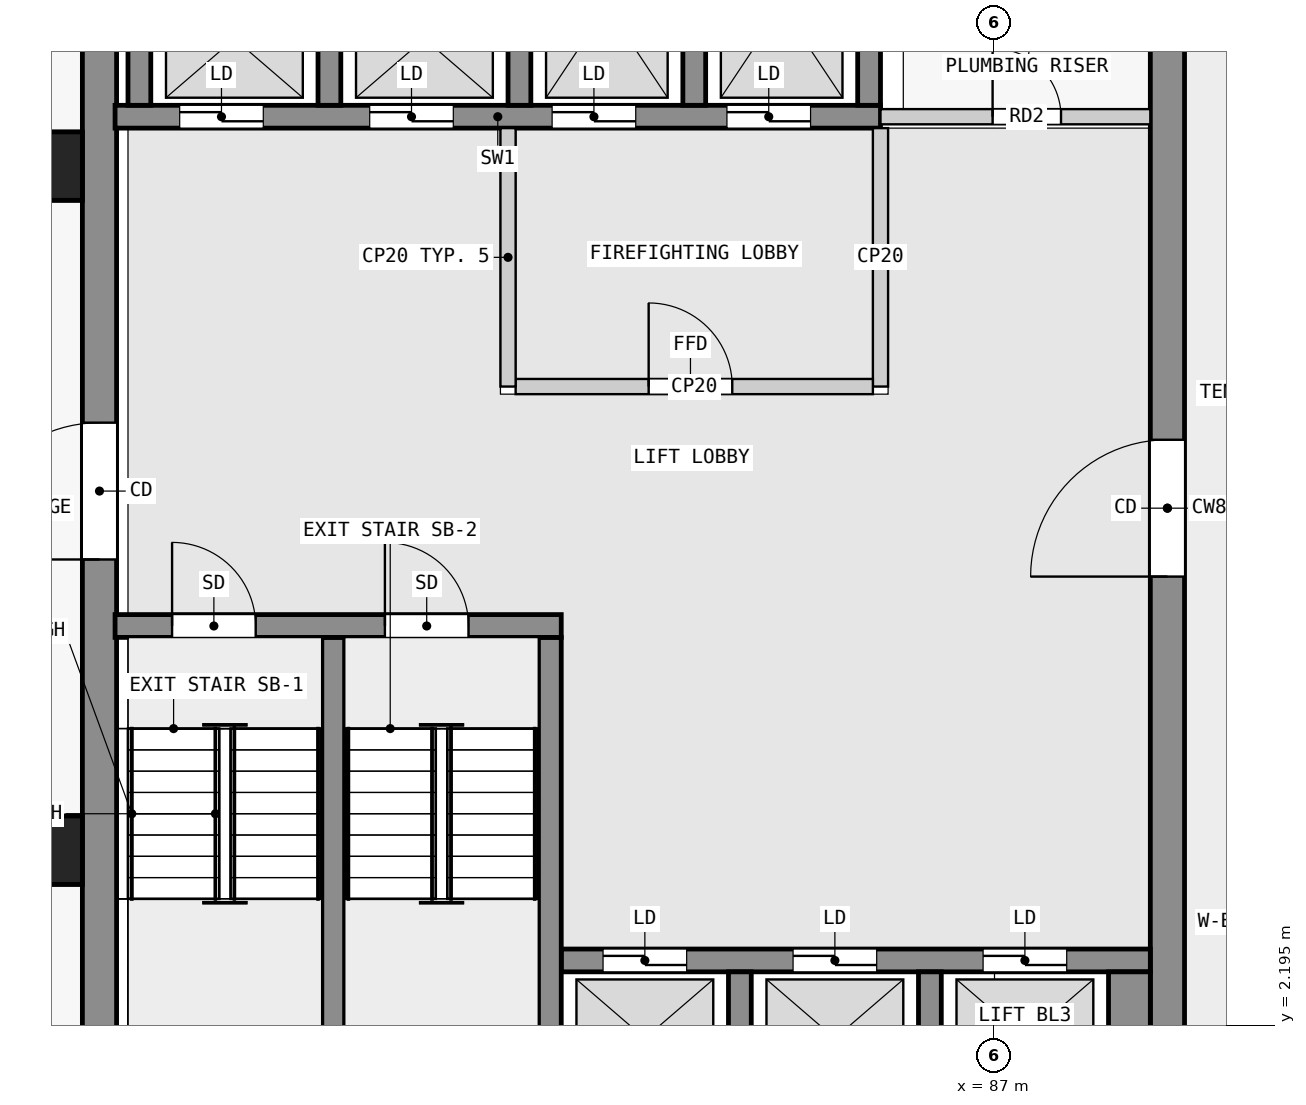
"""IFC4 building model, lengths in metres.
Left out: names, types, materials, properties, quantities, classifications, styles, units other than length and angle.
Written with IfcOpenShell. Run it as: python <this file> out.ifc"""

import sys

from ifc_helpers import new_model, si_unit, direction, frame, frame_2d, origin, origin_2d, place, context, subcontext, project, spatial, rectangle, extrude, element, fill, save


model = new_model("IFC4")
c1 = context("Model", 3, precision=1e-05, world=origin(), true_north=direction((0.0, 1.0)))
c2 = subcontext(c1, "Body", "Model", "MODEL_VIEW")
j1 = project(units=[si_unit("LENGTHUNIT", "METRE"), si_unit("PLANEANGLEUNIT", "RADIAN")], contexts=[c1])
p1 = place(None, origin())
s1 = spatial("IfcSite", under=j1, at=p1, CompositionType="ELEMENT")
p2 = place(p1, origin())
s2 = spatial("IfcBuilding", under=s1, at=p2, CompositionType="ELEMENT")
p3 = place(p2, frame((0.0, 0.0, 72.3)))
s3 = spatial("IfcBuildingStorey", under=s2, at=p3, CompositionType="ELEMENT", Elevation=72.3)
for number, where, z_axis, x_axis in (
    (1, (74.55, 13.5, 0.0), (0.0, 0.0, 1.0), (1.0, 0.0, 0.0)),
    (2, (74.55, 4.5, 0.0), (0.0, 0.0, 1.0), (1.0, 0.0, 0.0)),
):
    element("IfcColumn", number, at=place(p3, frame(where, z_axis=z_axis, x_axis=x_axis)), inside=s3, PredefinedType="COLUMN", context=c2, shape_type="SweptSolid", body=[
        extrude(rectangle(XDim=0.9, YDim=0.9, at=origin_2d()), origin(), (0.0, 0.0, 1.0), 6.0),
    ])
p4 = place(p3, frame((75.225, 0.45, 0.0), z_axis=(0.0, 0.0, 1.0), x_axis=(0.0, 1.0, 0.0)))
e3 = element("IfcWall", 3, at=p4, inside=s3, PredefinedType="SHEAR", context=c2, shape_type="SweptSolid", body=[
    extrude(rectangle(XDim=17.1, YDim=0.45, at=frame_2d((8.55, 0.0))), origin(), (0.0, 0.0, 1.0), 5.75),
])
p5 = place(p4, frame((7.875, 0.0, 0.0)))
e4 = element("IfcOpeningElement", 4, at=p5, cuts=e3, PredefinedType="OPENING", context=c2, shape_type="SweptSolid", body=[
    extrude(rectangle(XDim=1.8, YDim=2.1, at=frame_2d((0.9, 1.05))), frame((0.0, 0.235, 0.0), z_axis=(0.0, -1.0, 0.0), x_axis=(1.0, 0.0, 0.0)), (0.0, 0.0, 1.0), 0.47),
])
p6 = place(p3, frame((89.275, 0.45, 0.0), z_axis=(0.0, 0.0, 1.0), x_axis=(0.0, 1.0, 0.0)))
e5 = element("IfcWall", 5, at=p6, inside=s3, PredefinedType="SHEAR", context=c2, shape_type="SweptSolid", body=[
    extrude(rectangle(XDim=17.1, YDim=0.45, at=frame_2d((8.55, 0.0))), origin(), (0.0, 0.0, 1.0), 5.75),
])
p7 = place(p6, frame((7.65, 0.0, 0.0)))
e6 = element("IfcOpeningElement", 6, at=p7, cuts=e5, PredefinedType="OPENING", context=c2, shape_type="SweptSolid", body=[
    extrude(rectangle(XDim=1.8, YDim=2.1, at=frame_2d((0.9, 1.05))), frame((0.0, 0.235, 0.0), z_axis=(0.0, -1.0, 0.0), x_axis=(1.0, 0.0, 0.0)), (0.0, 0.0, 1.0), 0.47),
])
p8 = place(p6, frame((15.65, 0.0, 0.0)))
e7 = element("IfcOpeningElement", 7, at=p8, cuts=e5, PredefinedType="OPENING", context=c2, shape_type="SweptSolid", body=[
    extrude(rectangle(XDim=0.9, YDim=2.1, at=frame_2d((0.45, 1.05))), frame((0.0, 0.235, 0.0), z_axis=(0.0, -1.0, 0.0), x_axis=(1.0, 0.0, 0.0)), (0.0, 0.0, 1.0), 0.47),
])
p9 = place(p3, frame((75.43, 7.45, 0.0), z_axis=(0.0, 0.0, 1.0), x_axis=(1.0, 0.0, 0.0)))
e8 = element("IfcWall", 8, at=p9, inside=s3, PredefinedType="SHEAR", context=c2, shape_type="SweptSolid", body=[
    extrude(rectangle(XDim=5.87, YDim=0.3, at=frame_2d((2.935, 0.0))), origin(), (0.0, 0.0, 1.0), 5.75),
])
p10 = place(p9, frame((0.75, 0.0, 0.0)))
e9 = element("IfcOpeningElement", 9, at=p10, cuts=e8, PredefinedType="OPENING", context=c2, shape_type="SweptSolid", body=[
    extrude(rectangle(XDim=1.1, YDim=2.1, at=frame_2d((0.55, 1.05))), frame((0.0, 0.16, 0.0), z_axis=(0.0, -1.0, 0.0), x_axis=(1.0, 0.0, 0.0)), (0.0, 0.0, 1.0), 0.32),
])
p11 = place(p9, frame((3.55, 0.0, 0.0)))
e10 = element("IfcOpeningElement", 10, at=p11, cuts=e8, PredefinedType="OPENING", context=c2, shape_type="SweptSolid", body=[
    extrude(rectangle(XDim=1.1, YDim=2.1, at=frame_2d((0.55, 1.05))), frame((0.0, 0.16, 0.0), z_axis=(0.0, -1.0, 0.0), x_axis=(1.0, 0.0, 0.0)), (0.0, 0.0, 1.0), 0.32),
])
for number, where, z_axis, x_axis in (
    (11, (78.3, 0.9, 0.0), (0.0, 0.0, 1.0), (0.0, 1.0, 0.0)),
    (12, (81.15, 0.9, 0.0), (0.0, 0.0, 1.0), (0.0, 1.0, 0.0)),
):
    element("IfcWall", number, at=place(p3, frame(where, z_axis=z_axis, x_axis=x_axis)), inside=s3, PredefinedType="SHEAR", context=c2, shape_type="SweptSolid", body=[
        extrude(rectangle(XDim=6.4, YDim=0.3, at=frame_2d((3.2, 0.0))), origin(), (0.0, 0.0, 1.0), 5.75),
    ])
for number, where, z_axis, x_axis in (
    (13, (83.65, 0.9, 0.0), (0.0, 0.0, 1.0), (0.0, 1.0, 0.0)),
    (14, (86.15, 0.9, 0.0), (0.0, 0.0, 1.0), (0.0, 1.0, 0.0)),
):
    element("IfcWall", number, at=place(p3, frame(where, z_axis=z_axis, x_axis=x_axis)), inside=s3, PredefinedType="SHEAR", context=c2, shape_type="SweptSolid", body=[
        extrude(rectangle(XDim=2.0, YDim=0.3, at=frame_2d((1.0, 0.0))), origin(), (0.0, 0.0, 1.0), 5.75),
    ])
p12 = place(p3, frame((88.775, 0.9, 0.0), z_axis=(0.0, 0.0, 1.0), x_axis=(0.0, 1.0, 0.0)))
e15 = element("IfcWall", 15, at=p12, inside=s3, PredefinedType="SHEAR", context=c2, shape_type="SweptSolid", body=[
    extrude(rectangle(XDim=2.0, YDim=0.55, at=frame_2d((1.0, 0.0))), origin(), (0.0, 0.0, 1.0), 5.75),
])
p13 = place(p3, frame((81.3, 3.05, 0.0), z_axis=(0.0, 0.0, 1.0), x_axis=(1.0, 0.0, 0.0)))
e16 = element("IfcWall", 16, at=p13, inside=s3, PredefinedType="SHEAR", context=c2, shape_type="SweptSolid", body=[
    extrude(rectangle(XDim=7.75, YDim=0.3, at=frame_2d((3.875, 0.0))), origin(), (0.0, 0.0, 1.0), 5.75),
])
p14 = place(p13, frame((0.55, 0.0, 0.0)))
e17 = element("IfcOpeningElement", 17, at=p14, cuts=e16, PredefinedType="OPENING", context=c2, shape_type="SweptSolid", body=[
    extrude(rectangle(XDim=1.1, YDim=2.1, at=frame_2d((0.55, 1.05))), frame((0.0, 0.16, 0.0), z_axis=(0.0, -1.0, 0.0), x_axis=(1.0, 0.0, 0.0)), (0.0, 0.0, 1.0), 0.32),
])
p15 = place(p13, frame((3.05, 0.0, 0.0)))
e18 = element("IfcOpeningElement", 18, at=p15, cuts=e16, PredefinedType="OPENING", context=c2, shape_type="SweptSolid", body=[
    extrude(rectangle(XDim=1.1, YDim=2.1, at=frame_2d((0.55, 1.05))), frame((0.0, 0.16, 0.0), z_axis=(0.0, -1.0, 0.0), x_axis=(1.0, 0.0, 0.0)), (0.0, 0.0, 1.0), 0.32),
])
p16 = place(p13, frame((5.55, 0.0, 0.0)))
e19 = element("IfcOpeningElement", 19, at=p16, cuts=e16, PredefinedType="OPENING", context=c2, shape_type="SweptSolid", body=[
    extrude(rectangle(XDim=1.1, YDim=2.1, at=frame_2d((0.55, 1.05))), frame((0.0, 0.16, 0.0), z_axis=(0.0, -1.0, 0.0), x_axis=(1.0, 0.0, 0.0)), (0.0, 0.0, 1.0), 0.32),
])
p17 = place(p3, frame((75.43, 14.15, 0.0), z_axis=(0.0, 0.0, 1.0), x_axis=(1.0, 0.0, 0.0)))
e20 = element("IfcWall", 20, at=p17, inside=s3, PredefinedType="SHEAR", context=c2, shape_type="SweptSolid", body=[
    extrude(rectangle(XDim=10.07, YDim=0.3, at=frame_2d((5.035, 0.0))), origin(), (0.0, 0.0, 1.0), 5.75),
])
p18 = place(p17, frame((0.85, 0.0, 0.0)))
e21 = element("IfcOpeningElement", 21, at=p18, cuts=e20, PredefinedType="OPENING", context=c2, shape_type="SweptSolid", body=[
    extrude(rectangle(XDim=1.1, YDim=2.1, at=frame_2d((0.55, 1.05))), frame((0.0, 0.16, 0.0), z_axis=(0.0, -1.0, 0.0), x_axis=(1.0, 0.0, 0.0)), (0.0, 0.0, 1.0), 0.32),
])
p19 = place(p17, frame((3.35, 0.0, 0.0)))
e22 = element("IfcOpeningElement", 22, at=p19, cuts=e20, PredefinedType="OPENING", context=c2, shape_type="SweptSolid", body=[
    extrude(rectangle(XDim=1.1, YDim=2.1, at=frame_2d((0.55, 1.05))), frame((0.0, 0.16, 0.0), z_axis=(0.0, -1.0, 0.0), x_axis=(1.0, 0.0, 0.0)), (0.0, 0.0, 1.0), 0.32),
])
p20 = place(p17, frame((5.75, 0.0, 0.0)))
e23 = element("IfcOpeningElement", 23, at=p20, cuts=e20, PredefinedType="OPENING", context=c2, shape_type="SweptSolid", body=[
    extrude(rectangle(XDim=1.1, YDim=2.1, at=frame_2d((0.55, 1.05))), frame((0.0, 0.16, 0.0), z_axis=(0.0, -1.0, 0.0), x_axis=(1.0, 0.0, 0.0)), (0.0, 0.0, 1.0), 0.32),
])
p21 = place(p17, frame((8.05, 0.0, 0.0)))
e24 = element("IfcOpeningElement", 24, at=p21, cuts=e20, PredefinedType="OPENING", context=c2, shape_type="SweptSolid", body=[
    extrude(rectangle(XDim=1.1, YDim=2.1, at=frame_2d((0.55, 1.05))), frame((0.0, 0.16, 0.0), z_axis=(0.0, -1.0, 0.0), x_axis=(1.0, 0.0, 0.0)), (0.0, 0.0, 1.0), 0.32),
])
for number, where, z_axis, x_axis in (
    (25, (75.75, 14.3, 0.0), (0.0, 0.0, 1.0), (0.0, 1.0, 0.0)),
    (26, (78.25, 14.3, 0.0), (0.0, 0.0, 1.0), (0.0, 1.0, 0.0)),
    (27, (80.75, 14.3, 0.0), (0.0, 0.0, 1.0), (0.0, 1.0, 0.0)),
    (28, (83.05, 14.3, 0.0), (0.0, 0.0, 1.0), (0.0, 1.0, 0.0)),
    (29, (85.35, 14.3, 0.0), (0.0, 0.0, 1.0), (0.0, 1.0, 0.0)),
):
    element("IfcWall", number, at=place(p3, frame(where, z_axis=z_axis, x_axis=x_axis)), inside=s3, PredefinedType="SHEAR", context=c2, shape_type="SweptSolid", body=[
        extrude(rectangle(XDim=2.8, YDim=0.3, at=frame_2d((1.4, 0.0))), origin(), (0.0, 0.0, 1.0), 5.75),
    ])
p22 = place(p3, frame((80.6, 10.6, 0.0), z_axis=(0.0, 0.0, 1.0), x_axis=(0.0, 1.0, 0.0)))
e30 = element("IfcWall", 30, at=p22, inside=s3, PredefinedType="PARTITIONING", context=c2, shape_type="SweptSolid", body=[
    extrude(rectangle(XDim=3.4, YDim=0.2, at=frame_2d((1.7, 0.0))), origin(), (0.0, 0.0, 1.0), 5.75),
])
p23 = place(p3, frame((80.7, 10.6, 0.0), z_axis=(0.0, 0.0, 1.0), x_axis=(1.0, 0.0, 0.0)))
e31 = element("IfcWall", 31, at=p23, inside=s3, PredefinedType="PARTITIONING", context=c2, shape_type="SweptSolid", body=[
    extrude(rectangle(XDim=4.7, YDim=0.2, at=frame_2d((2.35, 0.0))), origin(), (0.0, 0.0, 1.0), 5.75),
])
p24 = place(p23, frame((1.75, 0.0, 0.0)))
e32 = element("IfcOpeningElement", 32, at=p24, cuts=e31, PredefinedType="OPENING", context=c2, shape_type="SweptSolid", body=[
    extrude(rectangle(XDim=1.1, YDim=2.1, at=frame_2d((0.55, 1.05))), frame((0.0, 0.11, 0.0), z_axis=(0.0, -1.0, 0.0), x_axis=(1.0, 0.0, 0.0)), (0.0, 0.0, 1.0), 0.22),
])
p25 = place(p3, frame((85.5, 10.6, 0.0), z_axis=(0.0, 0.0, 1.0), x_axis=(0.0, 1.0, 0.0)))
e33 = element("IfcWall", 33, at=p25, inside=s3, PredefinedType="PARTITIONING", context=c2, shape_type="SweptSolid", body=[
    extrude(rectangle(XDim=3.4, YDim=0.2, at=frame_2d((1.7, 0.0))), origin(), (0.0, 0.0, 1.0), 5.75),
])
p26 = place(p3, frame((85.5, 14.15, 0.0), z_axis=(0.0, 0.0, 1.0), x_axis=(1.0, 0.0, 0.0)))
e34 = element("IfcWall", 34, at=p26, inside=s3, PredefinedType="PARTITIONING", context=c2, shape_type="SweptSolid", body=[
    extrude(rectangle(XDim=3.55, YDim=0.2, at=frame_2d((1.775, 0.0))), origin(), (0.0, 0.0, 1.0), 5.75),
])
p27 = place(p26, frame((1.475, 0.0, 0.0)))
e35 = element("IfcOpeningElement", 35, at=p27, cuts=e34, PredefinedType="OPENING", context=c2, shape_type="SweptSolid", body=[
    extrude(rectangle(XDim=0.9, YDim=2.1, at=frame_2d((0.45, 1.05))), frame((0.0, 0.11, 0.0), z_axis=(0.0, -1.0, 0.0), x_axis=(1.0, 0.0, 0.0)), (0.0, 0.0, 1.0), 0.22),
])
p28 = place(p24, origin())
e36 = element("IfcDoor", 36, at=p28, inside=s3, OperationType="SINGLE_SWING_LEFT", PredefinedType="DOOR", context=c2, shape_type="SweptSolid", body=[
    extrude(rectangle(XDim=1.1, YDim=2.1, at=frame_2d((0.55, 1.05))), frame((0.0, 0.025, 0.0), z_axis=(0.0, -1.0, 0.0), x_axis=(1.0, 0.0, 0.0)), (0.0, 0.0, 1.0), 0.05),
])
fill(e32, e36)
p29 = place(p14, origin())
e37 = element("IfcDoor", 37, at=p29, inside=s3, OperationType="DOUBLE_DOOR_SLIDING", PredefinedType="DOOR", context=c2, shape_type="SweptSolid", body=[
    extrude(rectangle(XDim=1.1, YDim=2.1, at=frame_2d((0.55, 1.05))), frame((0.0, 0.025, 0.0), z_axis=(0.0, -1.0, 0.0), x_axis=(1.0, 0.0, 0.0)), (0.0, 0.0, 1.0), 0.05),
])
fill(e17, e37)
p30 = place(p15, origin())
e38 = element("IfcDoor", 38, at=p30, inside=s3, OperationType="DOUBLE_DOOR_SLIDING", PredefinedType="DOOR", context=c2, shape_type="SweptSolid", body=[
    extrude(rectangle(XDim=1.1, YDim=2.1, at=frame_2d((0.55, 1.05))), frame((0.0, 0.025, 0.0), z_axis=(0.0, -1.0, 0.0), x_axis=(1.0, 0.0, 0.0)), (0.0, 0.0, 1.0), 0.05),
])
fill(e18, e38)
p31 = place(p16, origin())
e39 = element("IfcDoor", 39, at=p31, inside=s3, OperationType="DOUBLE_DOOR_SLIDING", PredefinedType="DOOR", context=c2, shape_type="SweptSolid", body=[
    extrude(rectangle(XDim=1.1, YDim=2.1, at=frame_2d((0.55, 1.05))), frame((0.0, 0.025, 0.0), z_axis=(0.0, -1.0, 0.0), x_axis=(1.0, 0.0, 0.0)), (0.0, 0.0, 1.0), 0.05),
])
fill(e19, e39)
p32 = place(p18, origin())
e40 = element("IfcDoor", 40, at=p32, inside=s3, OperationType="DOUBLE_DOOR_SLIDING", PredefinedType="DOOR", context=c2, shape_type="SweptSolid", body=[
    extrude(rectangle(XDim=1.1, YDim=2.1, at=frame_2d((0.55, 1.05))), frame((0.0, 0.025, 0.0), z_axis=(0.0, -1.0, 0.0), x_axis=(1.0, 0.0, 0.0)), (0.0, 0.0, 1.0), 0.05),
])
fill(e21, e40)
p33 = place(p19, origin())
e41 = element("IfcDoor", 41, at=p33, inside=s3, OperationType="DOUBLE_DOOR_SLIDING", PredefinedType="DOOR", context=c2, shape_type="SweptSolid", body=[
    extrude(rectangle(XDim=1.1, YDim=2.1, at=frame_2d((0.55, 1.05))), frame((0.0, 0.025, 0.0), z_axis=(0.0, -1.0, 0.0), x_axis=(1.0, 0.0, 0.0)), (0.0, 0.0, 1.0), 0.05),
])
fill(e22, e41)
p34 = place(p20, origin())
e42 = element("IfcDoor", 42, at=p34, inside=s3, OperationType="DOUBLE_DOOR_SLIDING", PredefinedType="DOOR", context=c2, shape_type="SweptSolid", body=[
    extrude(rectangle(XDim=1.1, YDim=2.1, at=frame_2d((0.55, 1.05))), frame((0.0, 0.025, 0.0), z_axis=(0.0, -1.0, 0.0), x_axis=(1.0, 0.0, 0.0)), (0.0, 0.0, 1.0), 0.05),
])
fill(e23, e42)
p35 = place(p21, origin())
e43 = element("IfcDoor", 43, at=p35, inside=s3, OperationType="DOUBLE_DOOR_SLIDING", PredefinedType="DOOR", context=c2, shape_type="SweptSolid", body=[
    extrude(rectangle(XDim=1.1, YDim=2.1, at=frame_2d((0.55, 1.05))), frame((0.0, 0.025, 0.0), z_axis=(0.0, -1.0, 0.0), x_axis=(1.0, 0.0, 0.0)), (0.0, 0.0, 1.0), 0.05),
])
fill(e24, e43)
p36 = place(p10, origin())
e44 = element("IfcDoor", 44, at=p36, inside=s3, OperationType="SINGLE_SWING_RIGHT", PredefinedType="DOOR", context=c2, shape_type="SweptSolid", body=[
    extrude(rectangle(XDim=1.1, YDim=2.1, at=frame_2d((0.55, 1.05))), frame((0.0, 0.025, 0.0), z_axis=(0.0, -1.0, 0.0), x_axis=(1.0, 0.0, 0.0)), (0.0, 0.0, 1.0), 0.05),
])
fill(e9, e44)
p37 = place(p11, origin())
e45 = element("IfcDoor", 45, at=p37, inside=s3, OperationType="SINGLE_SWING_LEFT", PredefinedType="DOOR", context=c2, shape_type="SweptSolid", body=[
    extrude(rectangle(XDim=1.1, YDim=2.1, at=frame_2d((0.55, 1.05))), frame((0.0, 0.025, 0.0), z_axis=(0.0, -1.0, 0.0), x_axis=(1.0, 0.0, 0.0)), (0.0, 0.0, 1.0), 0.05),
])
fill(e10, e45)
p38 = place(p5, origin())
e46 = element("IfcDoor", 46, at=p38, inside=s3, OperationType="DOUBLE_DOOR_SINGLE_SWING", PredefinedType="DOOR", context=c2, shape_type="SweptSolid", body=[
    extrude(rectangle(XDim=1.8, YDim=2.1, at=frame_2d((0.9, 1.05))), frame((0.0, 0.025, 0.0), z_axis=(0.0, -1.0, 0.0), x_axis=(1.0, 0.0, 0.0)), (0.0, 0.0, 1.0), 0.05),
])
fill(e4, e46)
p39 = place(p7, origin())
e47 = element("IfcDoor", 47, at=p39, inside=s3, OperationType="DOUBLE_DOOR_SINGLE_SWING", PredefinedType="DOOR", context=c2, shape_type="SweptSolid", body=[
    extrude(rectangle(XDim=1.8, YDim=2.1, at=frame_2d((0.9, 1.05))), frame((0.0, 0.025, 0.0), z_axis=(0.0, -1.0, 0.0), x_axis=(1.0, 0.0, 0.0)), (0.0, 0.0, 1.0), 0.05),
])
fill(e6, e47)
p40 = place(p27, origin())
e48 = element("IfcDoor", 48, at=p40, inside=s3, OperationType="SINGLE_SWING_LEFT", PredefinedType="DOOR", context=c2, shape_type="SweptSolid", body=[
    extrude(rectangle(XDim=0.9, YDim=2.1, at=frame_2d((0.45, 1.05))), frame((0.0, 0.025, 0.0), z_axis=(0.0, -1.0, 0.0), x_axis=(1.0, 0.0, 0.0)), (0.0, 0.0, 1.0), 0.05),
])
fill(e35, e48)
save(model, sys.argv[1])
